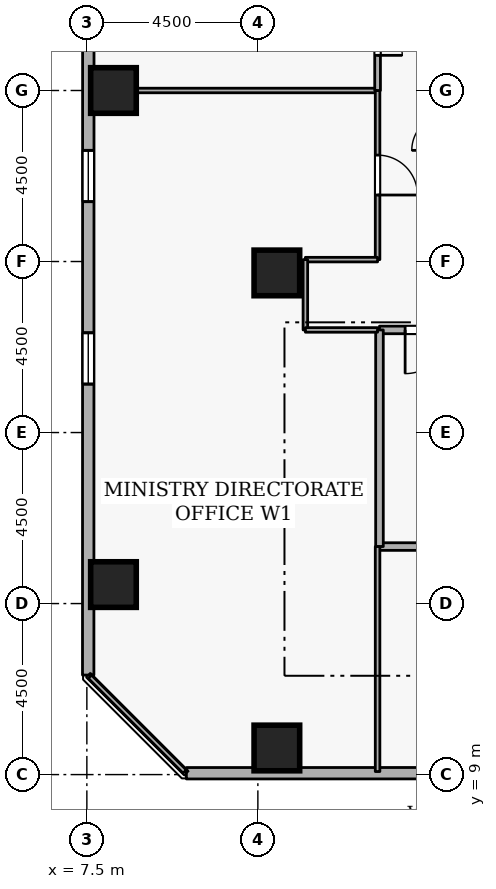
"""IFC4 building model, lengths in metres.
Left out: names, types, materials, properties, quantities, classifications, styles, units other than length and angle.
Written with IfcOpenShell. Run it as: python <this file> out.ifc"""

import sys

from ifc_helpers import new_model, si_unit, direction, frame, frame_2d, origin, origin_2d, place, context, subcontext, project, spatial, rectangle, extrude, element, fill, save


model = new_model("IFC4")
c1 = context("Model", 3, precision=1e-05, world=origin(), true_north=direction((0.0, 1.0)))
c2 = subcontext(c1, "Body", "Model", "MODEL_VIEW")
j1 = project(units=[si_unit("LENGTHUNIT", "METRE"), si_unit("PLANEANGLEUNIT", "RADIAN")], contexts=[c1])
p1 = place(None, origin())
s1 = spatial("IfcSite", under=j1, at=p1, CompositionType="ELEMENT")
p2 = place(p1, origin())
s2 = spatial("IfcBuilding", under=s1, at=p2, CompositionType="ELEMENT")
p3 = place(p2, frame((0.0, 0.0, 94.5)))
s3 = spatial("IfcBuildingStorey", under=s2, at=p3, CompositionType="ELEMENT", Elevation=94.5)
for number, where, z_axis, x_axis in (
    (1, (12.5, 9.7, 0.0), (0.0, 0.0, 1.0), (1.0, 0.0, 0.0)),
    (2, (8.2, 14.0, 0.0), (0.0, 0.0, 1.0), (1.0, 0.0, 0.0)),
    (3, (8.2, 27.0, 0.0), (0.0, 0.0, 1.0), (1.0, 0.0, 0.0)),
    (4, (12.5, 22.2, 0.0), (0.0, 0.0, 1.0), (1.0, 0.0, 0.0)),
):
    element("IfcColumn", number, at=place(p3, frame(where, z_axis=z_axis, x_axis=x_axis)), inside=s3, PredefinedType="COLUMN", context=c2, shape_type="SweptSolid", body=[
        extrude(rectangle(XDim=1.2, YDim=1.2, at=origin_2d()), origin(), (0.0, 0.0, 1.0), 3.6),
    ])
p4 = place(p3, frame((10.119, 9.035, 0.0), z_axis=(0.0, 0.0, 1.0), x_axis=(0.999999983371, 0.000182370391, 0.0)))
e5 = element("IfcWall", 5, at=p4, inside=s3, PredefinedType="STANDARD", context=c2, shape_type="SweptSolid", body=[
    extrude(rectangle(XDim=34.806, YDim=0.3, at=frame_2d((17.403, 0.0))), origin(), (0.0, 0.0, 1.0), 2.22),
])
p5 = place(p4, frame((6.6, 0.0, 0.72)))
e6 = element("IfcOpeningElement", 6, at=p5, cuts=e5, PredefinedType="OPENING", context=c2, shape_type="SweptSolid", body=[
    extrude(rectangle(XDim=1.35, YDim=1.05, at=frame_2d((0.675, 0.525))), frame((0.0, 0.16, 0.0), z_axis=(0.0, -1.0, 0.0), x_axis=(1.0, 0.0, 0.0)), (0.0, 0.0, 1.0), 0.32),
])
p6 = place(p4, frame((11.4, 0.0, 0.72)))
e7 = element("IfcOpeningElement", 7, at=p6, cuts=e5, PredefinedType="OPENING", context=c2, shape_type="SweptSolid", body=[
    extrude(rectangle(XDim=1.35, YDim=1.05, at=frame_2d((0.675, 0.525))), frame((0.0, 0.16, 0.0), z_axis=(0.0, -1.0, 0.0), x_axis=(1.0, 0.0, 0.0)), (0.0, 0.0, 1.0), 0.32),
])
p7 = place(p4, frame((21.0, 0.0, 0.72)))
e8 = element("IfcOpeningElement", 8, at=p7, cuts=e5, PredefinedType="OPENING", context=c2, shape_type="SweptSolid", body=[
    extrude(rectangle(XDim=1.35, YDim=1.05, at=frame_2d((0.675, 0.525))), frame((0.0, 0.16, 0.0), z_axis=(0.0, -1.0, 0.0), x_axis=(1.0, 0.0, 0.0)), (0.0, 0.0, 1.0), 0.32),
])
p8 = place(p4, frame((25.8, 0.0, 0.72)))
e9 = element("IfcOpeningElement", 9, at=p8, cuts=e5, PredefinedType="OPENING", context=c2, shape_type="SweptSolid", body=[
    extrude(rectangle(XDim=1.35, YDim=1.05, at=frame_2d((0.675, 0.525))), frame((0.0, 0.16, 0.0), z_axis=(0.0, -1.0, 0.0), x_axis=(1.0, 0.0, 0.0)), (0.0, 0.0, 1.0), 0.32),
])
p9 = place(p4, frame((30.6, 0.0, 0.72)))
e10 = element("IfcOpeningElement", 10, at=p9, cuts=e5, PredefinedType="OPENING", context=c2, shape_type="SweptSolid", body=[
    extrude(rectangle(XDim=1.35, YDim=1.05, at=frame_2d((0.675, 0.525))), frame((0.0, 0.16, 0.0), z_axis=(0.0, -1.0, 0.0), x_axis=(1.0, 0.0, 0.0)), (0.0, 0.0, 1.0), 0.32),
])
p10 = place(p3, frame((7.542, 46.425, 0.0), z_axis=(0.0, 0.0, 1.0), x_axis=(-0.000182370391, -0.999999983371, 0.0)))
e11 = element("IfcWall", 11, at=p10, inside=s3, PredefinedType="STANDARD", context=c2, shape_type="SweptSolid", body=[
    extrude(rectangle(XDim=34.806, YDim=0.3, at=frame_2d((17.403, 0.0))), origin(), (0.0, 0.0, 1.0), 2.22),
])
p11 = place(p10, frame((1.8, 0.0, 0.72)))
e12 = element("IfcOpeningElement", 12, at=p11, cuts=e11, PredefinedType="OPENING", context=c2, shape_type="SweptSolid", body=[
    extrude(rectangle(XDim=1.35, YDim=1.05, at=frame_2d((0.675, 0.525))), frame((0.0, 0.16, 0.0), z_axis=(0.0, -1.0, 0.0), x_axis=(1.0, 0.0, 0.0)), (0.0, 0.0, 1.0), 0.32),
])
p12 = place(p10, frame((11.4, 0.0, 0.72)))
e13 = element("IfcOpeningElement", 13, at=p12, cuts=e11, PredefinedType="OPENING", context=c2, shape_type="SweptSolid", body=[
    extrude(rectangle(XDim=1.35, YDim=1.05, at=frame_2d((0.675, 0.525))), frame((0.0, 0.16, 0.0), z_axis=(0.0, -1.0, 0.0), x_axis=(1.0, 0.0, 0.0)), (0.0, 0.0, 1.0), 0.32),
])
p13 = place(p10, frame((21.0, 0.0, 0.72)))
e14 = element("IfcOpeningElement", 14, at=p13, cuts=e11, PredefinedType="OPENING", context=c2, shape_type="SweptSolid", body=[
    extrude(rectangle(XDim=1.35, YDim=1.05, at=frame_2d((0.675, 0.525))), frame((0.0, 0.16, 0.0), z_axis=(0.0, -1.0, 0.0), x_axis=(1.0, 0.0, 0.0)), (0.0, 0.0, 1.0), 0.32),
])
p14 = place(p10, frame((25.8, 0.0, 0.72)))
e15 = element("IfcOpeningElement", 15, at=p14, cuts=e11, PredefinedType="OPENING", context=c2, shape_type="SweptSolid", body=[
    extrude(rectangle(XDim=1.35, YDim=1.05, at=frame_2d((0.675, 0.525))), frame((0.0, 0.16, 0.0), z_axis=(0.0, -1.0, 0.0), x_axis=(1.0, 0.0, 0.0)), (0.0, 0.0, 1.0), 0.32),
])
p15 = place(p3, frame((15.2, 15.0, 0.0), z_axis=(0.0, 0.0, 1.0), x_axis=(1.0, 0.0, 0.0)))
e16 = element("IfcWall", 16, at=p15, inside=s3, PredefinedType="STANDARD", context=c2, shape_type="SweptSolid", body=[
    extrude(rectangle(XDim=2.5, YDim=0.2, at=frame_2d((1.25, 0.0))), origin(), (0.0, 0.0, 1.0), 3.3),
])
p16 = place(p3, frame((17.7, 20.7, 0.0), z_axis=(0.0, 0.0, 1.0), x_axis=(-1.0, 0.0, 0.0)))
e17 = element("IfcWall", 17, at=p16, inside=s3, PredefinedType="STANDARD", context=c2, shape_type="SweptSolid", body=[
    extrude(rectangle(XDim=2.5, YDim=0.2, at=frame_2d((1.25, 0.0))), origin(), (0.0, 0.0, 1.0), 3.3),
])
p17 = place(p16, frame((0.675, 0.0, 0.0)))
e18 = element("IfcOpeningElement", 18, at=p17, cuts=e17, PredefinedType="OPENING", context=c2, shape_type="SweptSolid", body=[
    extrude(rectangle(XDim=1.15, YDim=2.1, at=frame_2d((0.575, 1.05))), frame((0.0, 0.11, 0.0), z_axis=(0.0, -1.0, 0.0), x_axis=(1.0, 0.0, 0.0)), (0.0, 0.0, 1.0), 0.22),
])
p18 = place(p3, frame((15.2, 20.7, 0.0), z_axis=(0.0, 0.0, 1.0), x_axis=(0.0, -1.0, 0.0)))
e19 = element("IfcWall", 19, at=p18, inside=s3, PredefinedType="STANDARD", context=c2, shape_type="SweptSolid", body=[
    extrude(rectangle(XDim=5.7, YDim=0.2, at=frame_2d((2.85, 0.0))), origin(), (0.0, 0.0, 1.0), 3.3),
])
p19 = place(p3, frame((7.58, 27.0, 0.0), z_axis=(0.0, 0.0, 1.0), x_axis=(1.0, 0.0, 0.0)))
e20 = element("IfcWall", 20, at=p19, inside=s3, PredefinedType="PARTITIONING", context=c2, shape_type="SweptSolid", body=[
    extrude(rectangle(XDim=7.57, YDim=0.12, at=frame_2d((3.785, 0.0))), origin(), (0.0, 0.0, 1.0), 1.685),
])
p20 = place(p3, frame((15.15, 27.0, 0.0), z_axis=(0.0, 0.0, 1.0), x_axis=(0.0, -1.0, 0.0)))
e21 = element("IfcWall", 21, at=p20, inside=s3, PredefinedType="PARTITIONING", context=c2, shape_type="SweptSolid", body=[
    extrude(rectangle(XDim=4.45, YDim=0.12, at=frame_2d((2.225, 0.0))), origin(), (0.0, 0.0, 1.0), 3.3),
])
p21 = place(p20, frame((1.7, 0.0, 0.0)))
e22 = element("IfcOpeningElement", 22, at=p21, cuts=e21, PredefinedType="OPENING", context=c2, shape_type="SweptSolid", body=[
    extrude(rectangle(XDim=1.05, YDim=2.1, at=frame_2d((0.525, 1.05))), frame((0.0, 0.07, 0.0), z_axis=(0.0, -1.0, 0.0), x_axis=(1.0, 0.0, 0.0)), (0.0, 0.0, 1.0), 0.14),
])
p22 = place(p3, frame((15.15, 22.55, 0.0), z_axis=(0.0, 0.0, 1.0), x_axis=(-1.0, 0.0, 0.0)))
e23 = element("IfcWall", 23, at=p22, inside=s3, PredefinedType="PARTITIONING", context=c2, shape_type="SweptSolid", body=[
    extrude(rectangle(XDim=1.9, YDim=0.12, at=frame_2d((0.95, 0.0))), origin(), (0.0, 0.0, 1.0), 3.3),
])
p23 = place(p3, frame((13.25, 22.55, 0.0), z_axis=(0.0, 0.0, 1.0), x_axis=(0.0, -1.0, 0.0)))
e24 = element("IfcWall", 24, at=p23, inside=s3, PredefinedType="PARTITIONING", context=c2, shape_type="SweptSolid", body=[
    extrude(rectangle(XDim=1.85, YDim=0.12, at=frame_2d((0.925, 0.0))), origin(), (0.0, 0.0, 1.0), 3.3),
])
p24 = place(p3, frame((13.25, 20.7, 0.0), z_axis=(0.0, 0.0, 1.0), x_axis=(1.0, 0.0, 0.0)))
e25 = element("IfcWall", 25, at=p24, inside=s3, PredefinedType="PARTITIONING", context=c2, shape_type="SweptSolid", body=[
    extrude(rectangle(XDim=1.9, YDim=0.12, at=frame_2d((0.95, 0.0))), origin(), (0.0, 0.0, 1.0), 3.3),
])
p25 = place(p3, frame((15.15, 15.0, 0.0), z_axis=(0.0, 0.0, 1.0), x_axis=(0.0, -1.0, 0.0)))
e26 = element("IfcWall", 26, at=p25, inside=s3, PredefinedType="PARTITIONING", context=c2, shape_type="SweptSolid", body=[
    extrude(rectangle(XDim=5.92, YDim=0.12, at=frame_2d((2.96, 0.0))), origin(), (0.0, 0.0, 1.0), 3.3),
])
p26 = place(p3, frame((10.075, 9.08, 0.0), z_axis=(0.0, 0.0, 1.0), x_axis=(-0.707106781187, 0.707106781187, 0.0)))
e27 = element("IfcWall", 27, at=p26, inside=s3, PredefinedType="PARTITIONING", context=c2, shape_type="SweptSolid", body=[
    extrude(rectangle(XDim=3.528, YDim=0.12, at=frame_2d((1.764, 0.0))), origin(), (0.0, 0.0, 1.0), 3.3),
])
p27 = place(p3, frame((15.15, 30.15, 0.0), z_axis=(0.0, 0.0, 1.0), x_axis=(0.0, -1.0, 0.0)))
e28 = element("IfcWall", 28, at=p27, inside=s3, PredefinedType="PARTITIONING", context=c2, shape_type="SweptSolid", body=[
    extrude(rectangle(XDim=3.15, YDim=0.15, at=frame_2d((1.575, 0.0))), origin(), (0.0, 0.0, 1.0), 3.3),
])
p28 = place(p27, frame((0.925, 0.0, 0.0)))
e29 = element("IfcOpeningElement", 29, at=p28, cuts=e28, PredefinedType="OPENING", context=c2, shape_type="SweptSolid", body=[
    extrude(rectangle(XDim=1.3, YDim=2.12, at=frame_2d((0.65, 1.06))), frame((0.0, 0.085, 0.0), z_axis=(0.0, -1.0, 0.0), x_axis=(1.0, 0.0, 0.0)), (0.0, 0.0, 1.0), 0.17),
])
p29 = place(p13, origin())
e30 = element("IfcWindow", 30, at=p29, inside=s3, PartitioningType="SINGLE_PANEL", PredefinedType="WINDOW", context=c2, shape_type="SweptSolid", body=[
    extrude(rectangle(XDim=1.35, YDim=1.05, at=frame_2d((0.675, 0.525))), frame((0.0, 0.03, 0.0), z_axis=(0.0, -1.0, 0.0), x_axis=(1.0, 0.0, 0.0)), (0.0, 0.0, 1.0), 0.06),
])
fill(e14, e30)
p30 = place(p14, origin())
e31 = element("IfcWindow", 31, at=p30, inside=s3, PartitioningType="SINGLE_PANEL", PredefinedType="WINDOW", context=c2, shape_type="SweptSolid", body=[
    extrude(rectangle(XDim=1.35, YDim=1.05, at=frame_2d((0.675, 0.525))), frame((0.0, 0.03, 0.0), z_axis=(0.0, -1.0, 0.0), x_axis=(1.0, 0.0, 0.0)), (0.0, 0.0, 1.0), 0.06),
])
fill(e15, e31)
p31 = place(p17, origin())
e32 = element("IfcDoor", 32, at=p31, inside=s3, OperationType="SINGLE_SWING_RIGHT", PredefinedType="DOOR", context=c2, shape_type="SweptSolid", body=[
    extrude(rectangle(XDim=1.15, YDim=2.1, at=frame_2d((0.575, 1.05))), frame((0.0, 0.025, 0.0), z_axis=(0.0, -1.0, 0.0), x_axis=(1.0, 0.0, 0.0)), (0.0, 0.0, 1.0), 0.05),
])
fill(e18, e32)
p32 = place(p21, origin())
e33 = element("IfcDoor", 33, at=p32, inside=s3, OperationType="SINGLE_SWING_RIGHT", PredefinedType="DOOR", context=c2, shape_type="SweptSolid", body=[
    extrude(rectangle(XDim=1.05, YDim=2.1, at=frame_2d((0.525, 1.05))), frame((0.0, 0.025, 0.0), z_axis=(0.0, -1.0, 0.0), x_axis=(1.0, 0.0, 0.0)), (0.0, 0.0, 1.0), 0.05),
])
fill(e22, e33)
p33 = place(p28, origin())
e34 = element("IfcDoor", 34, at=p33, inside=s3, OperationType="DOUBLE_DOOR_SINGLE_SWING", PredefinedType="DOOR", context=c2, shape_type="SweptSolid", body=[
    extrude(rectangle(XDim=1.3, YDim=2.12, at=frame_2d((0.65, 1.06))), frame((0.0, 0.025, 0.0), z_axis=(0.0, -1.0, 0.0), x_axis=(1.0, 0.0, 0.0)), (0.0, 0.0, 1.0), 0.05),
])
fill(e29, e34)
save(model, sys.argv[1])
